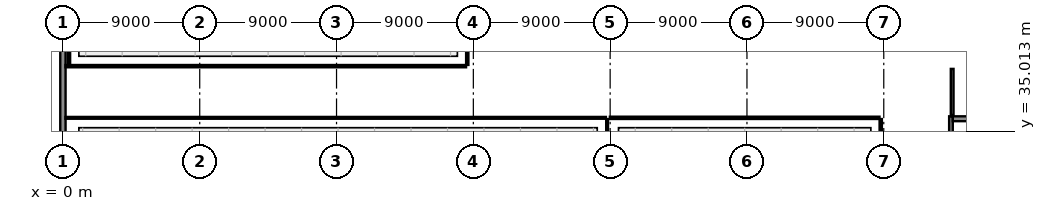
"""IFC4 building model, lengths in metres.
Left out: names, types, materials, properties, quantities, classifications, styles, units other than length and angle.
Written with IfcOpenShell. Run it as: python <this file> out.ifc"""

import sys

from ifc_helpers import new_model, si_unit, direction, frame, frame_2d, origin, place, context, subcontext, project, spatial, rectangle, extrude, element, fill, save


model = new_model("IFC4")
c1 = context("Model", 3, precision=1e-05, world=origin(), true_north=direction((0.0, 1.0)))
c2 = subcontext(c1, "Body", "Model", "MODEL_VIEW")
j1 = project(units=[si_unit("LENGTHUNIT", "METRE"), si_unit("PLANEANGLEUNIT", "RADIAN")], contexts=[c1])
p1 = place(None, origin())
s1 = spatial("IfcSite", under=j1, at=p1, CompositionType="ELEMENT")
p2 = place(p1, origin())
s2 = spatial("IfcBuilding", under=s1, at=p2, CompositionType="ELEMENT")
p3 = place(p2, origin())
s3 = spatial("IfcBuildingStorey", under=s2, at=p3, CompositionType="ELEMENT", Elevation=0.0)
p4 = place(p3, frame((0.0, 41.842, 0.0), z_axis=(0.0, 0.0, 1.0), x_axis=(0.0, -1.0, 0.0)))
e1 = element("IfcWall", 1, at=p4, inside=s3, PredefinedType="SOLIDWALL", context=c2, shape_type="SweptSolid", body=[
    extrude(rectangle(XDim=17.882, YDim=0.35, at=frame_2d((8.941, 0.0))), origin(), (0.0, 0.0, 1.0), 5.08),
])
p5 = place(p4, frame((7.641, 0.0, 0.0)))
e2 = element("IfcOpeningElement", 2, at=p5, cuts=e1, PredefinedType="OPENING", context=c2, shape_type="SweptSolid", body=[
    extrude(rectangle(XDim=2.6, YDim=2.6, at=frame_2d((1.3, 1.3))), frame((0.0, 0.19, 0.0), z_axis=(0.0, -1.0, 0.0), x_axis=(1.0, 0.0, 0.0)), (0.0, 0.0, 1.0), 0.38),
])
p6 = place(p3, frame((58.42, 33.24, 0.0), z_axis=(0.0, 0.0, 1.0), x_axis=(0.0, 1.0, 0.0)))
e3 = element("IfcWall", 3, at=p6, inside=s3, PredefinedType="SHEAR", context=c2, shape_type="SweptSolid", body=[
    extrude(rectangle(XDim=2.76, YDim=0.24, at=frame_2d((1.38, 0.0))), origin(), (0.0, 0.0, 1.0), 5.06),
])
p7 = place(p3, frame((58.54, 35.84, 0.0), z_axis=(0.0, 0.0, 1.0), x_axis=(1.0, 0.0, 0.0)))
e4 = element("IfcWall", 4, at=p7, inside=s3, PredefinedType="SHEAR", context=c2, shape_type="SweptSolid", body=[
    extrude(rectangle(XDim=3.9, YDim=0.32, at=frame_2d((1.95, 0.0))), origin(), (0.0, 0.0, 1.0), 5.06),
])
p8 = place(p7, frame((1.225, 0.0, 0.0)))
e5 = element("IfcOpeningElement", 5, at=p8, cuts=e4, PredefinedType="OPENING", context=c2, shape_type="SweptSolid", body=[
    extrude(rectangle(XDim=1.45, YDim=2.2, at=frame_2d((0.725, 1.1))), frame((0.0, 0.175, 0.0), z_axis=(0.0, -1.0, 0.0), x_axis=(1.0, 0.0, 0.0)), (0.0, 0.0, 1.0), 0.35),
])
p9 = place(p3, frame((58.5, 36.08, 0.0), z_axis=(0.0, 0.0, 1.0), x_axis=(0.0, 1.0, 0.0)))
e6 = element("IfcWall", 6, at=p9, inside=s3, PredefinedType="PARTITIONING", context=c2, shape_type="SweptSolid", body=[
    extrude(rectangle(XDim=3.04, YDim=0.18, at=frame_2d((1.52, 0.0))), origin(), (0.0, 0.0, 1.0), 5.04),
])
p10 = place(p9, frame((0.795, 0.0, 0.0)))
e7 = element("IfcOpeningElement", 7, at=p10, cuts=e6, PredefinedType="OPENING", context=c2, shape_type="SweptSolid", body=[
    extrude(rectangle(XDim=1.45, YDim=2.2, at=frame_2d((0.725, 1.1))), frame((0.0, 0.105, 0.0), z_axis=(0.0, -1.0, 0.0), x_axis=(1.0, 0.0, 0.0)), (0.0, 0.0, 1.0), 0.21),
])
p11 = place(p3, frame((0.17, 35.9, 0.0), z_axis=(0.0, 0.0, 1.0), x_axis=(1.0, 0.0, 0.0)))
e8 = element("IfcWall", 8, at=p11, inside=s3, PredefinedType="PARTITIONING", context=c2, shape_type="SweptSolid", body=[
    extrude(rectangle(XDim=35.55, YDim=0.12, at=frame_2d((17.775, 0.0))), origin(), (0.0, 0.0, 1.0), 5.04),
])
p12 = place(p11, frame((17.325, 0.0, 0.0)))
e9 = element("IfcOpeningElement", 9, at=p12, cuts=e8, PredefinedType="OPENING", context=c2, shape_type="SweptSolid", body=[
    extrude(rectangle(XDim=0.9, YDim=2.1, at=frame_2d((0.45, 1.05))), frame((0.0, 0.075, 0.0), z_axis=(0.0, -1.0, 0.0), x_axis=(1.0, 0.0, 0.0)), (0.0, 0.0, 1.0), 0.15),
])
p13 = place(p11, frame((32.6, 0.0, 1.05)))
e10 = element("IfcOpeningElement", 10, at=p13, cuts=e8, PredefinedType="OPENING", context=c2, shape_type="SweptSolid", body=[
    extrude(rectangle(XDim=2.1, YDim=1.2, at=frame_2d((1.05, 0.6))), frame((0.0, 0.075, 0.0), z_axis=(0.0, -1.0, 0.0), x_axis=(1.0, 0.0, 0.0)), (0.0, 0.0, 1.0), 0.15),
])
p14 = place(p3, frame((35.8, 35.82, 0.0), z_axis=(0.0, 0.0, 1.0), x_axis=(0.0, -1.0, 0.0)))
e11 = element("IfcWall", 11, at=p14, inside=s3, PredefinedType="PARTITIONING", context=c2, shape_type="SweptSolid", body=[
    extrude(rectangle(XDim=11.65, YDim=0.12, at=frame_2d((5.825, 0.0))), origin(), (0.0, 0.0, 1.0), 5.04),
])
p15 = place(p3, frame((53.8, 35.82, 0.0), z_axis=(0.0, 0.0, 1.0), x_axis=(0.0, -1.0, 0.0)))
e12 = element("IfcWall", 12, at=p15, inside=s3, PredefinedType="PARTITIONING", context=c2, shape_type="SweptSolid", body=[
    extrude(rectangle(XDim=11.34, YDim=0.15, at=frame_2d((5.67, 0.0))), origin(), (0.0, 0.0, 1.0), 4.365),
])
p16 = place(p3, frame((35.98, 35.9, 0.0), z_axis=(0.0, 0.0, 1.0), x_axis=(1.0, 0.0, 0.0)))
e13 = element("IfcWall", 13, at=p16, inside=s3, PredefinedType="PARTITIONING", context=c2, shape_type="SweptSolid", body=[
    extrude(rectangle(XDim=17.74, YDim=0.15, at=frame_2d((8.87, 0.0))), origin(), (0.0, 0.0, 1.0), 5.04),
])
p17 = place(p16, frame((8.345, 0.0, 0.0)))
e14 = element("IfcOpeningElement", 14, at=p17, cuts=e13, PredefinedType="OPENING", context=c2, shape_type="SweptSolid", body=[
    extrude(rectangle(XDim=1.05, YDim=2.25, at=frame_2d((0.525, 1.125))), frame((0.0, 0.09, 0.0), z_axis=(0.0, -1.0, 0.0), x_axis=(1.0, 0.0, 0.0)), (0.0, 0.0, 1.0), 0.18),
])
p18 = place(p16, frame((15.09, 0.0, 1.05)))
e15 = element("IfcOpeningElement", 15, at=p18, cuts=e13, PredefinedType="OPENING", context=c2, shape_type="SweptSolid", body=[
    extrude(rectangle(XDim=1.8, YDim=1.1, at=frame_2d((0.9, 0.55))), frame((0.0, 0.09, 0.0), z_axis=(0.0, -1.0, 0.0), x_axis=(1.0, 0.0, 0.0)), (0.0, 0.0, 1.0), 0.18),
])
p19 = place(p3, frame((26.52, 39.3, 0.0), z_axis=(0.0, 0.0, 1.0), x_axis=(-1.0, 0.0, 0.0)))
e16 = element("IfcWall", 16, at=p19, inside=s3, PredefinedType="PARTITIONING", context=c2, shape_type="SweptSolid", body=[
    extrude(rectangle(XDim=26.35, YDim=0.15, at=frame_2d((13.175, 0.0))), origin(), (0.0, 0.0, 1.0), 5.04),
])
p20 = place(p19, frame((12.65, 0.0, 0.0)))
e17 = element("IfcOpeningElement", 17, at=p20, cuts=e16, PredefinedType="OPENING", context=c2, shape_type="SweptSolid", body=[
    extrude(rectangle(XDim=1.05, YDim=2.25, at=frame_2d((0.525, 1.125))), frame((0.0, 0.09, 0.0), z_axis=(0.0, -1.0, 0.0), x_axis=(1.0, 0.0, 0.0)), (0.0, 0.0, 1.0), 0.18),
])
p21 = place(p19, frame((24.3, 0.0, 1.05)))
e18 = element("IfcOpeningElement", 18, at=p21, cuts=e16, PredefinedType="OPENING", context=c2, shape_type="SweptSolid", body=[
    extrude(rectangle(XDim=1.2, YDim=1.0, at=frame_2d((0.6, 0.5))), frame((0.0, 0.09, 0.0), z_axis=(0.0, -1.0, 0.0), x_axis=(1.0, 0.0, 0.0)), (0.0, 0.0, 1.0), 0.18),
])
p22 = place(p3, frame((0.4, 39.37, 0.0), z_axis=(0.0, 0.0, 1.0), x_axis=(0.0, 1.0, 0.0)))
e19 = element("IfcWall", 19, at=p22, inside=s3, PredefinedType="PARTITIONING", context=c2, shape_type="SweptSolid", body=[
    extrude(rectangle(XDim=26.472, YDim=0.15, at=frame_2d((13.236, 0.0))), origin(), (0.0, 0.0, 1.0), 5.04),
])
p23 = place(p3, frame((26.6, 65.83, 0.0), z_axis=(0.0, 0.0, 1.0), x_axis=(0.0, -1.0, 0.0)))
e20 = element("IfcWall", 20, at=p23, inside=s3, PredefinedType="PARTITIONING", context=c2, shape_type="SweptSolid", body=[
    extrude(rectangle(XDim=26.45, YDim=0.15, at=frame_2d((13.225, 0.0))), origin(), (0.0, 0.0, 1.0), 5.04),
])
p24 = place(p10, origin())
e21 = element("IfcDoor", 21, at=p24, inside=s3, OperationType="DOUBLE_DOOR_SINGLE_SWING", PredefinedType="DOOR", context=c2, shape_type="SweptSolid", body=[
    extrude(rectangle(XDim=1.45, YDim=2.2, at=frame_2d((0.725, 1.1))), frame((0.0, 0.025, 0.0), z_axis=(0.0, -1.0, 0.0), x_axis=(1.0, 0.0, 0.0)), (0.0, 0.0, 1.0), 0.05),
])
fill(e7, e21)
p25 = place(p12, origin())
e22 = element("IfcDoor", 22, at=p25, inside=s3, OperationType="SINGLE_SWING_LEFT", PredefinedType="DOOR", context=c2, shape_type="SweptSolid", body=[
    extrude(rectangle(XDim=0.9, YDim=2.1, at=frame_2d((0.45, 1.05))), frame((0.0, 0.025, 0.0), z_axis=(0.0, -1.0, 0.0), x_axis=(1.0, 0.0, 0.0)), (0.0, 0.0, 1.0), 0.05),
])
fill(e9, e22)
p26 = place(p13, origin())
e23 = element("IfcWindow", 23, at=p26, inside=s3, PartitioningType="SINGLE_PANEL", PredefinedType="WINDOW", context=c2, shape_type="SweptSolid", body=[
    extrude(rectangle(XDim=2.1, YDim=1.2, at=frame_2d((1.05, 0.6))), frame((0.0, 0.03, 0.0), z_axis=(0.0, -1.0, 0.0), x_axis=(1.0, 0.0, 0.0)), (0.0, 0.0, 1.0), 0.06),
])
fill(e10, e23)
p27 = place(p17, frame((1.05, 0.0, 0.0), z_axis=(0.0, 0.0, 1.0), x_axis=(-1.0, 0.0, 0.0)))
e24 = element("IfcDoor", 24, at=p27, inside=s3, OperationType="SINGLE_SWING_RIGHT", PredefinedType="DOOR", context=c2, shape_type="SweptSolid", body=[
    extrude(rectangle(XDim=1.05, YDim=2.25, at=frame_2d((0.525, 1.125))), frame((0.0, 0.025, 0.0), z_axis=(0.0, -1.0, 0.0), x_axis=(1.0, 0.0, 0.0)), (0.0, 0.0, 1.0), 0.05),
])
fill(e14, e24)
p28 = place(p18, origin())
e25 = element("IfcWindow", 25, at=p28, inside=s3, PartitioningType="SINGLE_PANEL", PredefinedType="WINDOW", context=c2, shape_type="SweptSolid", body=[
    extrude(rectangle(XDim=1.8, YDim=1.1, at=frame_2d((0.9, 0.55))), frame((0.0, 0.03, 0.0), z_axis=(0.0, -1.0, 0.0), x_axis=(1.0, 0.0, 0.0)), (0.0, 0.0, 1.0), 0.06),
])
fill(e15, e25)
p29 = place(p20, frame((1.05, 0.0, 0.0), z_axis=(0.0, 0.0, 1.0), x_axis=(-1.0, 0.0, 0.0)))
e26 = element("IfcDoor", 26, at=p29, inside=s3, OperationType="SINGLE_SWING_RIGHT", PredefinedType="DOOR", context=c2, shape_type="SweptSolid", body=[
    extrude(rectangle(XDim=1.05, YDim=2.25, at=frame_2d((0.525, 1.125))), frame((0.0, 0.025, 0.0), z_axis=(0.0, -1.0, 0.0), x_axis=(1.0, 0.0, 0.0)), (0.0, 0.0, 1.0), 0.05),
])
fill(e17, e26)
p30 = place(p21, origin())
e27 = element("IfcWindow", 27, at=p30, inside=s3, PartitioningType="SINGLE_PANEL", PredefinedType="WINDOW", context=c2, shape_type="SweptSolid", body=[
    extrude(rectangle(XDim=1.2, YDim=1.0, at=frame_2d((0.6, 0.5))), frame((0.0, 0.03, 0.0), z_axis=(0.0, -1.0, 0.0), x_axis=(1.0, 0.0, 0.0)), (0.0, 0.0, 1.0), 0.06),
])
fill(e18, e27)
save(model, sys.argv[1])
